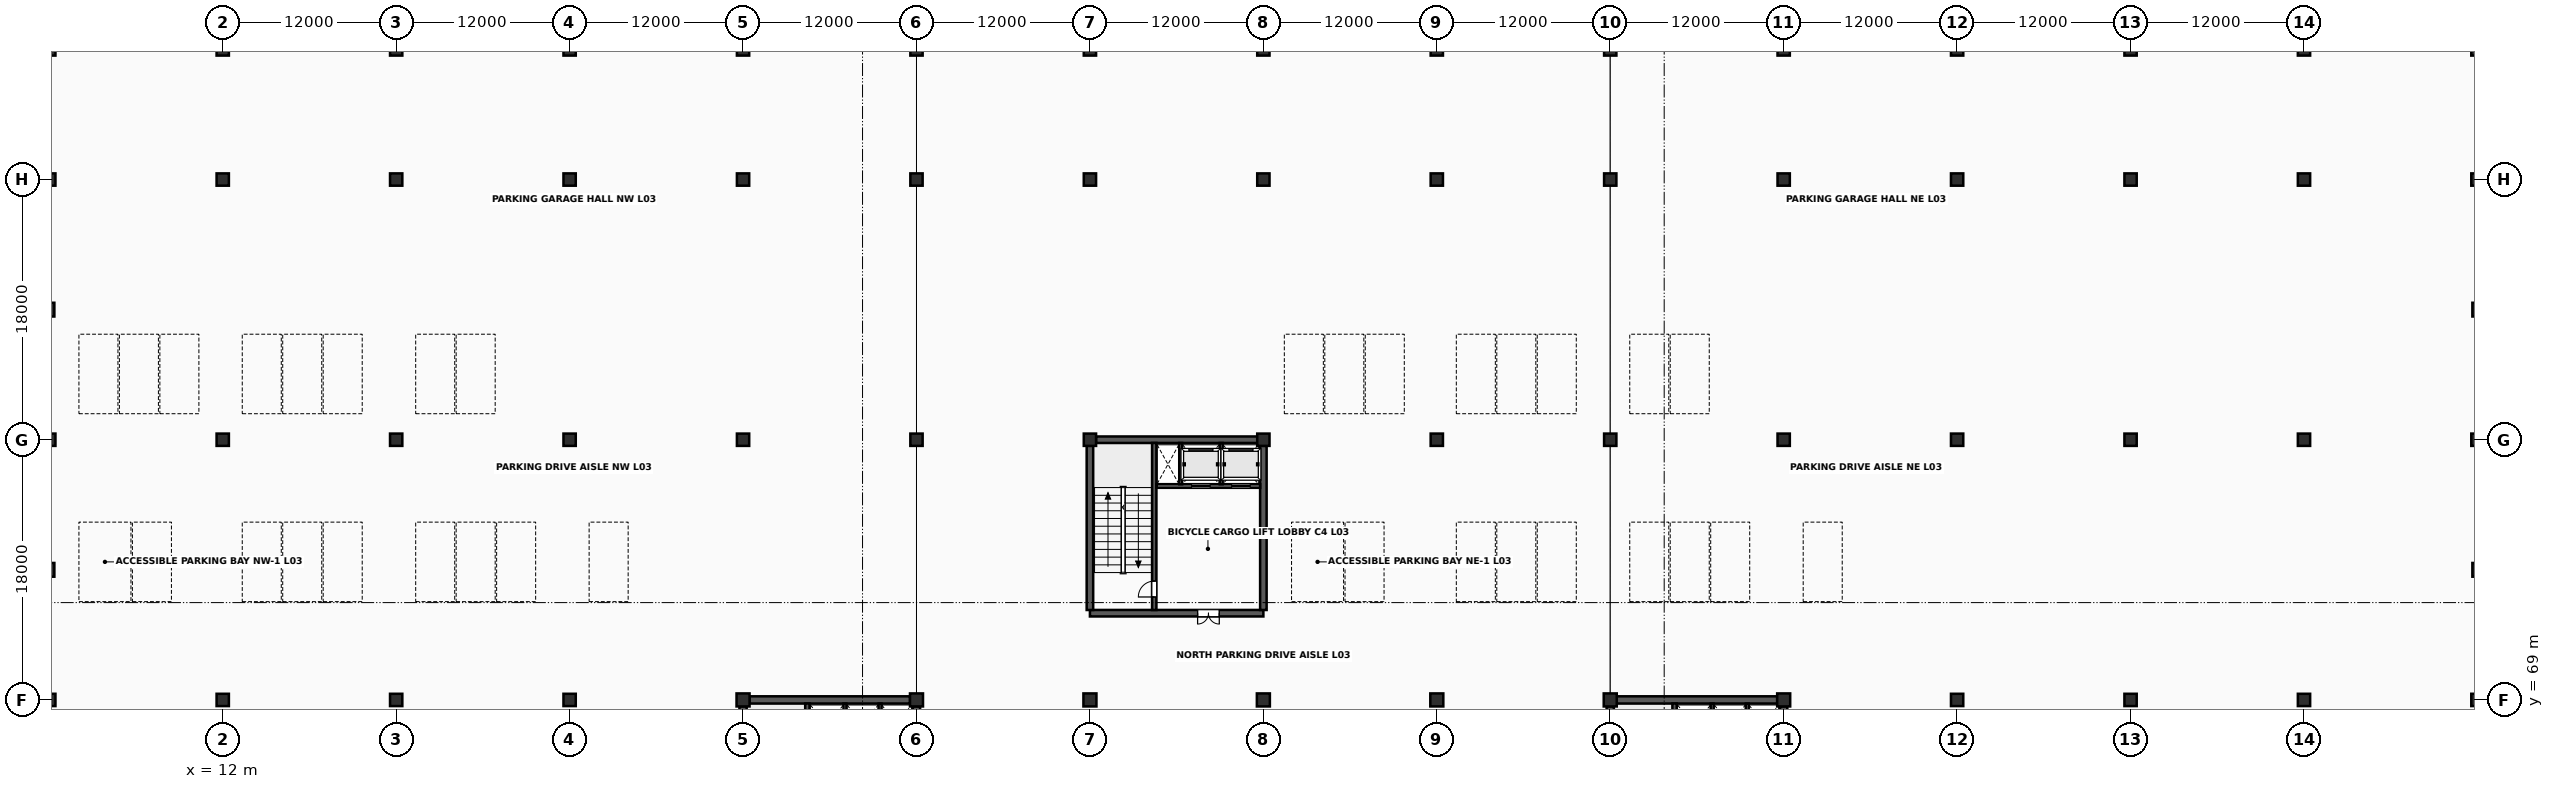
"""IFC4 building model, lengths in metres.
Left out: names, types, materials, properties, quantities, classifications, styles, units other than length and angle.
Written with IfcOpenShell. Run it as: python <this file> out.ifc"""

import sys

from ifc_helpers import new_model, si_unit, direction, frame, frame_2d, origin, origin_2d, place, context, subcontext, project, spatial, rectangle, extrude, element, fill, save


model = new_model("IFC4")
c1 = context("Model", 3, precision=1e-05, world=origin(), true_north=direction((0.0, 1.0)))
c2 = subcontext(c1, "Body", "Model", "MODEL_VIEW")
j1 = project(units=[si_unit("LENGTHUNIT", "METRE"), si_unit("PLANEANGLEUNIT", "RADIAN")], contexts=[c1])
p1 = place(None, origin())
s1 = spatial("IfcSite", under=j1, at=p1, CompositionType="ELEMENT")
p2 = place(p1, origin())
s2 = spatial("IfcBuilding", under=s1, at=p2, CompositionType="ELEMENT")
p3 = place(p2, frame((0.0, 0.0, 13.4)))
s3 = spatial("IfcBuildingStorey", under=s2, at=p3, CompositionType="ELEMENT", Elevation=13.4)
for number, where, z_axis, x_axis in (
    (1, (0.0, 69.0, 0.0), (0.0, 0.0, 1.0), (1.0, 0.0, 0.0)),
    (2, (0.0, 87.0, 0.0), (0.0, 0.0, 1.0), (1.0, 0.0, 0.0)),
    (3, (0.0, 105.0, 0.0), (0.0, 0.0, 1.0), (1.0, 0.0, 0.0)),
    (4, (0.0, 114.0, 0.0), (0.0, 0.0, 1.0), (1.0, 0.0, 0.0)),
    (5, (12.0, 69.0, 0.0), (0.0, 0.0, 1.0), (1.0, 0.0, 0.0)),
    (6, (12.0, 87.0, 0.0), (0.0, 0.0, 1.0), (1.0, 0.0, 0.0)),
    (7, (12.0, 105.0, 0.0), (0.0, 0.0, 1.0), (1.0, 0.0, 0.0)),
    (8, (12.0, 114.0, 0.0), (0.0, 0.0, 1.0), (1.0, 0.0, 0.0)),
    (9, (24.0, 69.0, 0.0), (0.0, 0.0, 1.0), (1.0, 0.0, 0.0)),
    (10, (24.0, 87.0, 0.0), (0.0, 0.0, 1.0), (1.0, 0.0, 0.0)),
    (11, (24.0, 105.0, 0.0), (0.0, 0.0, 1.0), (1.0, 0.0, 0.0)),
    (12, (24.0, 114.0, 0.0), (0.0, 0.0, 1.0), (1.0, 0.0, 0.0)),
    (13, (36.0, 69.0, 0.0), (0.0, 0.0, 1.0), (1.0, 0.0, 0.0)),
    (14, (36.0, 87.0, 0.0), (0.0, 0.0, 1.0), (1.0, 0.0, 0.0)),
    (15, (36.0, 105.0, 0.0), (0.0, 0.0, 1.0), (1.0, 0.0, 0.0)),
    (16, (36.0, 114.0, 0.0), (0.0, 0.0, 1.0), (1.0, 0.0, 0.0)),
):
    element("IfcColumn", number, at=place(p3, frame(where, z_axis=z_axis, x_axis=x_axis)), inside=s3, PredefinedType="COLUMN", context=c2, shape_type="SweptSolid", body=[
        extrude(rectangle(XDim=0.85, YDim=0.85, at=origin_2d()), origin(), (0.0, 0.0, 1.0), 3.8),
    ])
p4 = place(p3, frame((48.0, 69.0, 0.0), z_axis=(0.0, 0.0, 1.0), x_axis=(1.0, 0.0, 0.0)))
e17 = element("IfcColumn", 17, at=p4, inside=s3, PredefinedType="COLUMN", context=c2, shape_type="SweptSolid", body=[
    extrude(rectangle(XDim=0.9, YDim=0.9, at=origin_2d()), origin(), (0.0, 0.0, 1.0), 3.8),
])
for number, where, z_axis, x_axis in (
    (18, (48.0, 87.0, 0.0), (0.0, 0.0, 1.0), (1.0, 0.0, 0.0)),
    (19, (48.0, 105.0, 0.0), (0.0, 0.0, 1.0), (1.0, 0.0, 0.0)),
    (20, (48.0, 114.0, 0.0), (0.0, 0.0, 1.0), (1.0, 0.0, 0.0)),
):
    element("IfcColumn", number, at=place(p3, frame(where, z_axis=z_axis, x_axis=x_axis)), inside=s3, PredefinedType="COLUMN", context=c2, shape_type="SweptSolid", body=[
        extrude(rectangle(XDim=0.85, YDim=0.85, at=origin_2d()), origin(), (0.0, 0.0, 1.0), 3.8),
    ])
p5 = place(p3, frame((60.0, 69.0, 0.0), z_axis=(0.0, 0.0, 1.0), x_axis=(1.0, 0.0, 0.0)))
e21 = element("IfcColumn", 21, at=p5, inside=s3, PredefinedType="COLUMN", context=c2, shape_type="SweptSolid", body=[
    extrude(rectangle(XDim=0.9, YDim=0.9, at=origin_2d()), origin(), (0.0, 0.0, 1.0), 3.8),
])
for number, where, z_axis, x_axis in (
    (22, (60.0, 87.0, 0.0), (0.0, 0.0, 1.0), (1.0, 0.0, 0.0)),
    (23, (60.0, 105.0, 0.0), (0.0, 0.0, 1.0), (1.0, 0.0, 0.0)),
    (24, (60.0, 114.0, 0.0), (0.0, 0.0, 1.0), (1.0, 0.0, 0.0)),
):
    element("IfcColumn", number, at=place(p3, frame(where, z_axis=z_axis, x_axis=x_axis)), inside=s3, PredefinedType="COLUMN", context=c2, shape_type="SweptSolid", body=[
        extrude(rectangle(XDim=0.85, YDim=0.85, at=origin_2d()), origin(), (0.0, 0.0, 1.0), 3.8),
    ])
p6 = place(p3, frame((72.0, 69.0, 0.0), z_axis=(0.0, 0.0, 1.0), x_axis=(1.0, 0.0, 0.0)))
e25 = element("IfcColumn", 25, at=p6, inside=s3, PredefinedType="COLUMN", context=c2, shape_type="SweptSolid", body=[
    extrude(rectangle(XDim=0.9, YDim=0.9, at=origin_2d()), origin(), (0.0, 0.0, 1.0), 3.8),
])
for number, where, z_axis, x_axis in (
    (26, (72.0, 87.0, 0.0), (0.0, 0.0, 1.0), (1.0, 0.0, 0.0)),
    (27, (72.0, 105.0, 0.0), (0.0, 0.0, 1.0), (1.0, 0.0, 0.0)),
    (28, (72.0, 114.0, 0.0), (0.0, 0.0, 1.0), (1.0, 0.0, 0.0)),
):
    element("IfcColumn", number, at=place(p3, frame(where, z_axis=z_axis, x_axis=x_axis)), inside=s3, PredefinedType="COLUMN", context=c2, shape_type="SweptSolid", body=[
        extrude(rectangle(XDim=0.85, YDim=0.85, at=origin_2d()), origin(), (0.0, 0.0, 1.0), 3.8),
    ])
p7 = place(p3, frame((84.0, 69.0, 0.0), z_axis=(0.0, 0.0, 1.0), x_axis=(1.0, 0.0, 0.0)))
e29 = element("IfcColumn", 29, at=p7, inside=s3, PredefinedType="COLUMN", context=c2, shape_type="SweptSolid", body=[
    extrude(rectangle(XDim=0.9, YDim=0.9, at=origin_2d()), origin(), (0.0, 0.0, 1.0), 3.8),
])
for number, where, z_axis, x_axis in (
    (30, (84.0, 87.0, 0.0), (0.0, 0.0, 1.0), (1.0, 0.0, 0.0)),
    (31, (84.0, 105.0, 0.0), (0.0, 0.0, 1.0), (1.0, 0.0, 0.0)),
    (32, (84.0, 114.0, 0.0), (0.0, 0.0, 1.0), (1.0, 0.0, 0.0)),
):
    element("IfcColumn", number, at=place(p3, frame(where, z_axis=z_axis, x_axis=x_axis)), inside=s3, PredefinedType="COLUMN", context=c2, shape_type="SweptSolid", body=[
        extrude(rectangle(XDim=0.85, YDim=0.85, at=origin_2d()), origin(), (0.0, 0.0, 1.0), 3.8),
    ])
p8 = place(p3, frame((96.0, 69.0, 0.0), z_axis=(0.0, 0.0, 1.0), x_axis=(1.0, 0.0, 0.0)))
e33 = element("IfcColumn", 33, at=p8, inside=s3, PredefinedType="COLUMN", context=c2, shape_type="SweptSolid", body=[
    extrude(rectangle(XDim=0.9, YDim=0.9, at=origin_2d()), origin(), (0.0, 0.0, 1.0), 3.8),
])
for number, where, z_axis, x_axis in (
    (34, (96.0, 87.0, 0.0), (0.0, 0.0, 1.0), (1.0, 0.0, 0.0)),
    (35, (96.0, 105.0, 0.0), (0.0, 0.0, 1.0), (1.0, 0.0, 0.0)),
    (36, (96.0, 114.0, 0.0), (0.0, 0.0, 1.0), (1.0, 0.0, 0.0)),
):
    element("IfcColumn", number, at=place(p3, frame(where, z_axis=z_axis, x_axis=x_axis)), inside=s3, PredefinedType="COLUMN", context=c2, shape_type="SweptSolid", body=[
        extrude(rectangle(XDim=0.85, YDim=0.85, at=origin_2d()), origin(), (0.0, 0.0, 1.0), 3.8),
    ])
p9 = place(p3, frame((108.0, 69.0, 0.0), z_axis=(0.0, 0.0, 1.0), x_axis=(1.0, 0.0, 0.0)))
e37 = element("IfcColumn", 37, at=p9, inside=s3, PredefinedType="COLUMN", context=c2, shape_type="SweptSolid", body=[
    extrude(rectangle(XDim=0.9, YDim=0.9, at=origin_2d()), origin(), (0.0, 0.0, 1.0), 3.8),
])
for number, where, z_axis, x_axis in (
    (38, (108.0, 87.0, 0.0), (0.0, 0.0, 1.0), (1.0, 0.0, 0.0)),
    (39, (108.0, 105.0, 0.0), (0.0, 0.0, 1.0), (1.0, 0.0, 0.0)),
    (40, (108.0, 114.0, 0.0), (0.0, 0.0, 1.0), (1.0, 0.0, 0.0)),
):
    element("IfcColumn", number, at=place(p3, frame(where, z_axis=z_axis, x_axis=x_axis)), inside=s3, PredefinedType="COLUMN", context=c2, shape_type="SweptSolid", body=[
        extrude(rectangle(XDim=0.85, YDim=0.85, at=origin_2d()), origin(), (0.0, 0.0, 1.0), 3.8),
    ])
p10 = place(p3, frame((120.0, 69.0, 0.0), z_axis=(0.0, 0.0, 1.0), x_axis=(1.0, 0.0, 0.0)))
e41 = element("IfcColumn", 41, at=p10, inside=s3, PredefinedType="COLUMN", context=c2, shape_type="SweptSolid", body=[
    extrude(rectangle(XDim=0.9, YDim=0.9, at=origin_2d()), origin(), (0.0, 0.0, 1.0), 3.8),
])
for number, where, z_axis, x_axis in (
    (42, (120.0, 87.0, 0.0), (0.0, 0.0, 1.0), (1.0, 0.0, 0.0)),
    (43, (120.0, 105.0, 0.0), (0.0, 0.0, 1.0), (1.0, 0.0, 0.0)),
    (44, (120.0, 114.0, 0.0), (0.0, 0.0, 1.0), (1.0, 0.0, 0.0)),
    (45, (132.0, 69.0, 0.0), (0.0, 0.0, 1.0), (1.0, 0.0, 0.0)),
    (46, (132.0, 87.0, 0.0), (0.0, 0.0, 1.0), (1.0, 0.0, 0.0)),
    (47, (132.0, 105.0, 0.0), (0.0, 0.0, 1.0), (1.0, 0.0, 0.0)),
    (48, (132.0, 114.0, 0.0), (0.0, 0.0, 1.0), (1.0, 0.0, 0.0)),
    (49, (144.0, 69.0, 0.0), (0.0, 0.0, 1.0), (1.0, 0.0, 0.0)),
    (50, (144.0, 87.0, 0.0), (0.0, 0.0, 1.0), (1.0, 0.0, 0.0)),
    (51, (144.0, 105.0, 0.0), (0.0, 0.0, 1.0), (1.0, 0.0, 0.0)),
    (52, (144.0, 114.0, 0.0), (0.0, 0.0, 1.0), (1.0, 0.0, 0.0)),
    (53, (156.0, 69.0, 0.0), (0.0, 0.0, 1.0), (1.0, 0.0, 0.0)),
    (54, (156.0, 87.0, 0.0), (0.0, 0.0, 1.0), (1.0, 0.0, 0.0)),
    (55, (156.0, 105.0, 0.0), (0.0, 0.0, 1.0), (1.0, 0.0, 0.0)),
    (56, (156.0, 114.0, 0.0), (0.0, 0.0, 1.0), (1.0, 0.0, 0.0)),
    (57, (168.0, 69.0, 0.0), (0.0, 0.0, 1.0), (1.0, 0.0, 0.0)),
    (58, (168.0, 87.0, 0.0), (0.0, 0.0, 1.0), (1.0, 0.0, 0.0)),
    (59, (168.0, 105.0, 0.0), (0.0, 0.0, 1.0), (1.0, 0.0, 0.0)),
    (60, (168.0, 114.0, 0.0), (0.0, 0.0, 1.0), (1.0, 0.0, 0.0)),
):
    element("IfcColumn", number, at=place(p3, frame(where, z_axis=z_axis, x_axis=x_axis)), inside=s3, PredefinedType="COLUMN", context=c2, shape_type="SweptSolid", body=[
        extrude(rectangle(XDim=0.85, YDim=0.85, at=origin_2d()), origin(), (0.0, 0.0, 1.0), 3.8),
    ])
for number, where, z_axis, x_axis in (
    (61, (0.0, 78.0, 0.0), (0.0, 0.0, 1.0), (1.0, 0.0, 0.0)),
    (62, (0.0, 96.0, 0.0), (0.0, 0.0, 1.0), (1.0, 0.0, 0.0)),
    (63, (168.0, 78.0, 0.0), (0.0, 0.0, 1.0), (1.0, 0.0, 0.0)),
    (64, (168.0, 96.0, 0.0), (0.0, 0.0, 1.0), (1.0, 0.0, 0.0)),
):
    element("IfcColumn", number, at=place(p3, frame(where, z_axis=z_axis, x_axis=x_axis)), inside=s3, PredefinedType="PILASTER", context=c2, shape_type="SweptSolid", body=[
        extrude(rectangle(XDim=0.7, YDim=0.95, at=origin_2d()), origin(), (0.0, 0.0, 1.0), 3.8),
    ])
for number, where, z_axis, x_axis in (
    (65, (48.447, 69.0, 0.0), (0.0, 0.0, 1.0), (1.0, 0.0, 0.0)),
    (66, (48.0, 57.447, 0.0), (0.0, 0.0, 1.0), (0.0, 1.0, 0.0)),
    (67, (60.0, 57.447, 0.0), (0.0, 0.0, 1.0), (0.0, 1.0, 0.0)),
):
    element("IfcWall", number, at=place(p3, frame(where, z_axis=z_axis, x_axis=x_axis)), inside=s3, PredefinedType="SHEAR", context=c2, shape_type="SweptSolid", body=[
        extrude(rectangle(XDim=11.106, YDim=0.5, at=frame_2d((5.553, 0.0))), origin(), (0.0, 0.0, 1.0), 3.618),
    ])
p11 = place(p3, frame((52.45, 57.247, 0.0), z_axis=(0.0, 0.0, 1.0), x_axis=(0.0, 1.0, 0.0)))
e68 = element("IfcWall", 68, at=p11, inside=s3, PredefinedType="SHEAR", context=c2, shape_type="SweptSolid", body=[
    extrude(rectangle(XDim=11.506, YDim=0.3, at=frame_2d((5.753, 0.0))), origin(), (0.0, 0.0, 1.0), 3.618),
])
p12 = place(p11, frame((0.9, 0.0, 0.0)))
e69 = element("IfcOpeningElement", 69, at=p12, cuts=e68, PredefinedType="OPENING", context=c2, shape_type="SweptSolid", body=[
    extrude(rectangle(XDim=1.1, YDim=2.2, at=frame_2d((0.55, 1.1))), frame((0.0, 0.165, 0.0), z_axis=(0.0, -1.0, 0.0), x_axis=(1.0, 0.0, 0.0)), (0.0, 0.0, 1.0), 0.33),
])
for number, where, z_axis, x_axis in (
    (70, (55.05, 65.92, 0.0), (0.0, 0.0, 1.0), (0.0, 1.0, 0.0)),
    (71, (57.48, 65.92, 0.0), (0.0, 0.0, 1.0), (0.0, 1.0, 0.0)),
):
    element("IfcWall", number, at=place(p3, frame(where, z_axis=z_axis, x_axis=x_axis)), inside=s3, PredefinedType="SOLIDWALL", context=c2, shape_type="SweptSolid", body=[
        extrude(rectangle(XDim=2.83, YDim=0.2, at=frame_2d((1.415, 0.0))), origin(), (0.0, 0.0, 1.0), 3.608),
    ])
for number, where, z_axis, x_axis in (
    (72, (108.447, 69.0, 0.0), (0.0, 0.0, 1.0), (1.0, 0.0, 0.0)),
    (73, (108.0, 57.447, 0.0), (0.0, 0.0, 1.0), (0.0, 1.0, 0.0)),
    (74, (120.0, 57.447, 0.0), (0.0, 0.0, 1.0), (0.0, 1.0, 0.0)),
):
    element("IfcWall", number, at=place(p3, frame(where, z_axis=z_axis, x_axis=x_axis)), inside=s3, PredefinedType="SHEAR", context=c2, shape_type="SweptSolid", body=[
        extrude(rectangle(XDim=11.106, YDim=0.5, at=frame_2d((5.553, 0.0))), origin(), (0.0, 0.0, 1.0), 3.618),
    ])
p13 = place(p3, frame((112.45, 57.247, 0.0), z_axis=(0.0, 0.0, 1.0), x_axis=(0.0, 1.0, 0.0)))
e75 = element("IfcWall", 75, at=p13, inside=s3, PredefinedType="SHEAR", context=c2, shape_type="SweptSolid", body=[
    extrude(rectangle(XDim=11.506, YDim=0.3, at=frame_2d((5.753, 0.0))), origin(), (0.0, 0.0, 1.0), 3.618),
])
p14 = place(p13, frame((0.9, 0.0, 0.0)))
e76 = element("IfcOpeningElement", 76, at=p14, cuts=e75, PredefinedType="OPENING", context=c2, shape_type="SweptSolid", body=[
    extrude(rectangle(XDim=1.1, YDim=2.2, at=frame_2d((0.55, 1.1))), frame((0.0, 0.165, 0.0), z_axis=(0.0, -1.0, 0.0), x_axis=(1.0, 0.0, 0.0)), (0.0, 0.0, 1.0), 0.33),
])
for number, where, z_axis, x_axis in (
    (77, (115.05, 65.92, 0.0), (0.0, 0.0, 1.0), (0.0, 1.0, 0.0)),
    (78, (117.48, 65.92, 0.0), (0.0, 0.0, 1.0), (0.0, 1.0, 0.0)),
):
    element("IfcWall", number, at=place(p3, frame(where, z_axis=z_axis, x_axis=x_axis)), inside=s3, PredefinedType="SOLIDWALL", context=c2, shape_type="SweptSolid", body=[
        extrude(rectangle(XDim=2.83, YDim=0.2, at=frame_2d((1.415, 0.0))), origin(), (0.0, 0.0, 1.0), 3.608),
    ])
p15 = place(p3, frame((72.0, 75.0, 0.0), z_axis=(0.0, 0.0, 1.0), x_axis=(1.0, 0.0, 0.0)))
e79 = element("IfcWall", 79, at=p15, inside=s3, PredefinedType="SHEAR", context=c2, shape_type="SweptSolid", body=[
    extrude(rectangle(XDim=12.0, YDim=0.45, at=frame_2d((6.0, 0.0))), origin(), (0.0, 0.0, 1.0), 3.618),
])
p16 = place(p15, frame((7.45, 0.0, 0.0)))
e80 = element("IfcOpeningElement", 80, at=p16, cuts=e79, PredefinedType="OPENING", context=c2, shape_type="SweptSolid", body=[
    extrude(rectangle(XDim=1.5, YDim=2.25, at=frame_2d((0.75, 1.125))), frame((0.0, 0.24, 0.0), z_axis=(0.0, -1.0, 0.0), x_axis=(1.0, 0.0, 0.0)), (0.0, 0.0, 1.0), 0.48),
])
p17 = place(p3, frame((72.422, 87.0, 0.0), z_axis=(0.0, 0.0, 1.0), x_axis=(1.0, 0.0, 0.0)))
e81 = element("IfcWall", 81, at=p17, inside=s3, PredefinedType="SHEAR", context=c2, shape_type="SweptSolid", body=[
    extrude(rectangle(XDim=11.156, YDim=0.45, at=frame_2d((5.578, 0.0))), origin(), (0.0, 0.0, 1.0), 3.618),
])
for number, where, z_axis, x_axis in (
    (82, (72.0, 75.222, 0.0), (0.0, 0.0, 1.0), (0.0, 1.0, 0.0)),
    (83, (84.0, 75.222, 0.0), (0.0, 0.0, 1.0), (0.0, 1.0, 0.0)),
):
    element("IfcWall", number, at=place(p3, frame(where, z_axis=z_axis, x_axis=x_axis)), inside=s3, PredefinedType="SHEAR", context=c2, shape_type="SweptSolid", body=[
        extrude(rectangle(XDim=11.356, YDim=0.45, at=frame_2d((5.678, 0.0))), origin(), (0.0, 0.0, 1.0), 3.618),
    ])
p18 = place(p3, frame((76.45, 75.222, 0.0), z_axis=(0.0, 0.0, 1.0), x_axis=(0.0, 1.0, 0.0)))
e84 = element("IfcWall", 84, at=p18, inside=s3, PredefinedType="SHEAR", context=c2, shape_type="SweptSolid", body=[
    extrude(rectangle(XDim=11.556, YDim=0.3, at=frame_2d((5.778, 0.0))), origin(), (0.0, 0.0, 1.0), 3.618),
])
p19 = place(p18, frame((0.9, 0.0, 0.0)))
e85 = element("IfcOpeningElement", 85, at=p19, cuts=e84, PredefinedType="OPENING", context=c2, shape_type="SweptSolid", body=[
    extrude(rectangle(XDim=1.1, YDim=2.2, at=frame_2d((0.55, 1.1))), frame((0.0, 0.165, 0.0), z_axis=(0.0, -1.0, 0.0), x_axis=(1.0, 0.0, 0.0)), (0.0, 0.0, 1.0), 0.33),
])
p20 = place(p3, frame((76.597, 83.8, 0.0), z_axis=(0.0, 0.0, 1.0), x_axis=(1.0, 0.0, 0.0)))
e86 = element("IfcWall", 86, at=p20, inside=s3, PredefinedType="SOLIDWALL", context=c2, shape_type="SweptSolid", body=[
    extrude(rectangle(XDim=7.181, YDim=0.25, at=frame_2d((3.591, 0.0))), origin(), (0.0, 0.0, 1.0), 3.618),
])
p21 = place(p20, frame((2.433, 0.0, 0.0)))
e87 = element("IfcOpeningElement", 87, at=p21, cuts=e86, PredefinedType="OPENING", context=c2, shape_type="SweptSolid", body=[
    extrude(rectangle(XDim=1.3, YDim=2.28, at=frame_2d((0.65, 1.14))), frame((0.0, 0.14, 0.0), z_axis=(0.0, -1.0, 0.0), x_axis=(1.0, 0.0, 0.0)), (0.0, 0.0, 1.0), 0.28),
])
p22 = place(p20, frame((5.203, 0.0, 0.0)))
e88 = element("IfcOpeningElement", 88, at=p22, cuts=e86, PredefinedType="OPENING", context=c2, shape_type="SweptSolid", body=[
    extrude(rectangle(XDim=1.3, YDim=2.28, at=frame_2d((0.65, 1.14))), frame((0.0, 0.14, 0.0), z_axis=(0.0, -1.0, 0.0), x_axis=(1.0, 0.0, 0.0)), (0.0, 0.0, 1.0), 0.28),
])
for number, where, z_axis, x_axis in (
    (89, (78.28, 83.92, 0.0), (0.0, 0.0, 1.0), (0.0, 1.0, 0.0)),
    (90, (81.08, 83.92, 0.0), (0.0, 0.0, 1.0), (0.0, 1.0, 0.0)),
):
    element("IfcWall", number, at=place(p3, frame(where, z_axis=z_axis, x_axis=x_axis)), inside=s3, PredefinedType="SOLIDWALL", context=c2, shape_type="SweptSolid", body=[
        extrude(rectangle(XDim=2.855, YDim=0.2, at=frame_2d((1.427, 0.0))), origin(), (0.0, 0.0, 1.0), 3.608),
    ])
p23 = place(p19, origin())
e91 = element("IfcDoor", 91, at=p23, inside=s3, OperationType="SINGLE_SWING_LEFT", PredefinedType="DOOR", context=c2, shape_type="SweptSolid", body=[
    extrude(rectangle(XDim=1.1, YDim=2.2, at=frame_2d((0.55, 1.1))), frame((0.0, 0.025, 0.0), z_axis=(0.0, -1.0, 0.0), x_axis=(1.0, 0.0, 0.0)), (0.0, 0.0, 1.0), 0.05),
])
fill(e85, e91)
p24 = place(p16, origin())
e92 = element("IfcDoor", 92, at=p24, inside=s3, OperationType="DOUBLE_DOOR_SINGLE_SWING", PredefinedType="DOOR", context=c2, shape_type="SweptSolid", body=[
    extrude(rectangle(XDim=1.5, YDim=2.25, at=frame_2d((0.75, 1.125))), frame((0.0, 0.025, 0.0), z_axis=(0.0, -1.0, 0.0), x_axis=(1.0, 0.0, 0.0)), (0.0, 0.0, 1.0), 0.05),
])
fill(e80, e92)
p25 = place(p21, origin())
e93 = element("IfcDoor", 93, at=p25, inside=s3, OperationType="SLIDING_TO_LEFT", PredefinedType="USERDEFINED", context=c2, shape_type="SweptSolid", body=[
    extrude(rectangle(XDim=1.3, YDim=2.28, at=frame_2d((0.65, 1.14))), frame((0.0, 0.025, 0.0), z_axis=(0.0, -1.0, 0.0), x_axis=(1.0, 0.0, 0.0)), (0.0, 0.0, 1.0), 0.05),
])
fill(e87, e93)
p26 = place(p22, origin())
e94 = element("IfcDoor", 94, at=p26, inside=s3, OperationType="SLIDING_TO_LEFT", PredefinedType="USERDEFINED", context=c2, shape_type="SweptSolid", body=[
    extrude(rectangle(XDim=1.3, YDim=2.28, at=frame_2d((0.65, 1.14))), frame((0.0, 0.025, 0.0), z_axis=(0.0, -1.0, 0.0), x_axis=(1.0, 0.0, 0.0)), (0.0, 0.0, 1.0), 0.05),
])
fill(e88, e94)
save(model, sys.argv[1])
